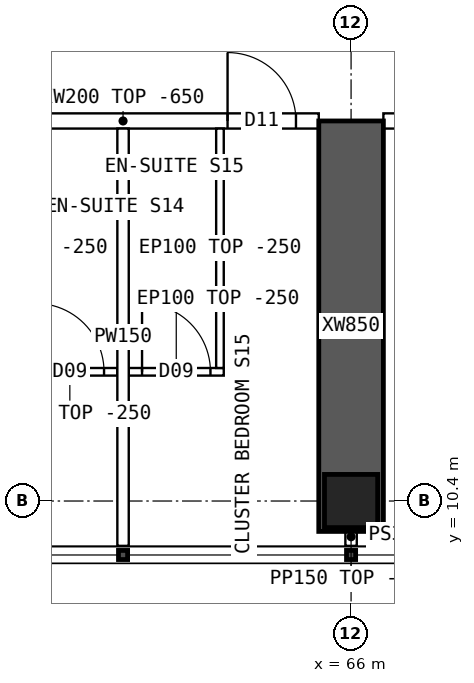
"""IFC4 building model, lengths in metres.
Left out: names, types, materials, properties, quantities, classifications, styles, units other than length and angle.
Written with IfcOpenShell. Run it as: python <this file> out.ifc"""

import sys

from ifc_helpers import new_model, si_unit, direction, frame, frame_2d, origin, origin_2d, place, context, subcontext, project, spatial, polyline, rectangle, hollow_rectangle, outline, extrude, element, fill, save


model = new_model("IFC4")
c1 = context("Model", 3, precision=1e-05, world=origin(), true_north=direction((0.0, 1.0)))
c2 = subcontext(c1, "Body", "Model", "MODEL_VIEW")
j1 = project(units=[si_unit("LENGTHUNIT", "METRE"), si_unit("PLANEANGLEUNIT", "RADIAN")], contexts=[c1])
p1 = place(None, origin())
s1 = spatial("IfcSite", under=j1, at=p1, CompositionType="ELEMENT")
p2 = place(p1, origin())
s2 = spatial("IfcBuilding", under=s1, at=p2, CompositionType="ELEMENT")
p3 = place(p2, frame((0.0, 0.0, 186.1)))
s3 = spatial("IfcBuildingStorey", under=s2, at=p3, CompositionType="ELEMENT", Elevation=186.1)
p4 = place(p3, frame((66.0, 10.4, 0.0), z_axis=(0.0, 0.0, 1.0), x_axis=(1.0, 0.0, 0.0)))
e1 = element("IfcColumn", 1, at=p4, inside=s3, PredefinedType="COLUMN", context=c2, shape_type="SweptSolid", body=[
    extrude(hollow_rectangle(XDim=0.7, YDim=0.7, WallThickness=0.07, at=origin_2d()), origin(), (0.0, 0.0, 1.0), 3.75),
])
p5 = place(p3, frame((66.0, 10.0, 0.0), z_axis=(0.0, 0.0, 1.0), x_axis=(0.0, 1.0, 0.0)))
e2 = element("IfcWall", 2, at=p5, inside=s3, PredefinedType="SHEAR", context=c2, shape_type="SweptSolid", body=[
    extrude(rectangle(XDim=5.4, YDim=0.85, at=frame_2d((2.7, 0.0))), origin(), (0.0, 0.0, 1.0), 3.75),
])
p6 = place(p3, frame((66.8, 9.95, 0.0), z_axis=(0.0, 0.0, 1.0), x_axis=(-1.0, 0.0, 0.0)))
e3 = element("IfcWall", 3, at=p6, inside=s3, PredefinedType="SOLIDWALL", context=c2, shape_type="SweptSolid", body=[
    extrude(rectangle(XDim=0.375, YDim=0.3, at=frame_2d((0.188, 0.0))), origin(), (0.0, 0.0, 1.0), 3.5),
])
p7 = place(p3, frame((60.425, 15.4, 0.0), z_axis=(0.0, 0.0, 1.0), x_axis=(1.0, 0.0, 0.0)))
e4 = element("IfcWall", 4, at=p7, inside=s3, PredefinedType="SOLIDWALL", context=c2, shape_type="SweptSolid", body=[
    extrude(outline(polyline([(0.0, 0.0), (5.15, 0.0), (5.15, 3.1), (0.0, 3.1), (0.0, 0.0)])), frame((0.0, 0.1, 0.0), z_axis=(0.0, -1.0, 0.0), x_axis=(1.0, 0.0, 0.0)), (0.0, 0.0, 1.0), 0.2),
])
p8 = place(p7, frame((0.1, 0.0, 0.0)))
e5 = element("IfcOpeningElement", 5, at=p8, cuts=e4, PredefinedType="OPENING", context=c2, shape_type="SweptSolid", body=[
    extrude(rectangle(XDim=0.9, YDim=2.1, at=frame_2d((0.45, 1.05))), frame((0.0, 0.11, 0.0), z_axis=(0.0, -1.0, 0.0), x_axis=(1.0, 0.0, 0.0)), (0.0, 0.0, 1.0), 0.22),
])
p9 = place(p7, frame((3.95, 0.0, 0.0)))
e6 = element("IfcOpeningElement", 6, at=p9, cuts=e4, PredefinedType="OPENING", context=c2, shape_type="SweptSolid", body=[
    extrude(rectangle(XDim=0.9, YDim=2.1, at=frame_2d((0.45, 1.05))), frame((0.0, 0.11, 0.0), z_axis=(0.0, -1.0, 0.0), x_axis=(1.0, 0.0, 0.0)), (0.0, 0.0, 1.0), 0.22),
])
p10 = place(p3, frame((66.425, 15.4, 0.0), z_axis=(0.0, 0.0, 1.0), x_axis=(1.0, 0.0, 0.0)))
e7 = element("IfcWall", 7, at=p10, inside=s3, PredefinedType="SOLIDWALL", context=c2, shape_type="SweptSolid", body=[
    extrude(rectangle(XDim=1.975, YDim=0.2, at=frame_2d((0.987, 0.0))), origin(), (0.0, 0.0, 1.0), 3.5),
])
p11 = place(p10, frame((0.2, 0.0, 0.0)))
e8 = element("IfcOpeningElement", 8, at=p11, cuts=e7, PredefinedType="OPENING", context=c2, shape_type="SweptSolid", body=[
    extrude(rectangle(XDim=0.9, YDim=2.1, at=frame_2d((0.45, 1.05))), frame((0.0, 0.11, 0.0), z_axis=(0.0, -1.0, 0.0), x_axis=(1.0, 0.0, 0.0)), (0.0, 0.0, 1.0), 0.22),
])
p12 = place(p3, frame((63.0, 9.81, 0.0), z_axis=(0.0, 0.0, 1.0), x_axis=(0.0, 1.0, 0.0)))
e9 = element("IfcWall", 9, at=p12, inside=s3, PredefinedType="PARTITIONING", context=c2, shape_type="SweptSolid", body=[
    extrude(outline(polyline([(0.0, 0.0), (5.49, 0.0), (5.49, 3.1), (5.442, 3.1), (5.44, 3.5), (0.792, 3.5), (0.79, 3.1), (0.392, 3.1), (0.39, 3.5), (0.0, 3.5), (0.0, 0.0)])), frame((0.0, 0.075, 0.0), z_axis=(0.0, -1.0, 0.0), x_axis=(1.0, 0.0, 0.0)), (0.0, 0.0, 1.0), 0.15),
])
p13 = place(p3, frame((62.925, 12.1, 0.0), z_axis=(0.0, 0.0, 1.0), x_axis=(-1.0, 0.0, 0.0)))
e10 = element("IfcWall", 10, at=p13, inside=s3, PredefinedType="PARTITIONING", context=c2, shape_type="SweptSolid", body=[
    extrude(rectangle(XDim=1.25, YDim=0.1, at=frame_2d((0.625, 0.0))), origin(), (0.0, 0.0, 1.0), 3.5),
])
p14 = place(p13, frame((0.175, 0.0, 0.0)))
e11 = element("IfcOpeningElement", 11, at=p14, cuts=e10, PredefinedType="OPENING", context=c2, shape_type="SweptSolid", body=[
    extrude(rectangle(XDim=0.9, YDim=2.1, at=frame_2d((0.45, 1.05))), frame((0.0, 0.06, 0.0), z_axis=(0.0, -1.0, 0.0), x_axis=(1.0, 0.0, 0.0)), (0.0, 0.0, 1.0), 0.12),
])
p15 = place(p3, frame((64.325, 12.1, 0.0), z_axis=(0.0, 0.0, 1.0), x_axis=(-1.0, 0.0, 0.0)))
e12 = element("IfcWall", 12, at=p15, inside=s3, PredefinedType="PARTITIONING", context=c2, shape_type="SweptSolid", body=[
    extrude(rectangle(XDim=1.25, YDim=0.1, at=frame_2d((0.625, 0.0))), origin(), (0.0, 0.0, 1.0), 3.5),
])
p16 = place(p15, frame((0.175, 0.0, 0.0)))
e13 = element("IfcOpeningElement", 13, at=p16, cuts=e12, PredefinedType="OPENING", context=c2, shape_type="SweptSolid", body=[
    extrude(rectangle(XDim=0.9, YDim=2.1, at=frame_2d((0.45, 1.05))), frame((0.0, 0.06, 0.0), z_axis=(0.0, -1.0, 0.0), x_axis=(1.0, 0.0, 0.0)), (0.0, 0.0, 1.0), 0.12),
])
p17 = place(p3, frame((64.275, 12.15, 0.0), z_axis=(0.0, 0.0, 1.0), x_axis=(0.0, 1.0, 0.0)))
e14 = element("IfcWall", 14, at=p17, inside=s3, PredefinedType="PARTITIONING", context=c2, shape_type="SweptSolid", body=[
    extrude(outline(polyline([(0.0, 0.0), (3.15, 0.0), (3.15, 3.1), (3.102, 3.1), (3.1, 3.5), (0.0, 3.5), (0.0, 0.0)])), frame((0.0, 0.05, 0.0), z_axis=(0.0, -1.0, 0.0), x_axis=(1.0, 0.0, 0.0)), (0.0, 0.0, 1.0), 0.1),
])
p18 = place(p3, frame((66.0, 10.05, 0.0), z_axis=(0.0, 0.0, 1.0), x_axis=(0.0, -1.0, 0.0)))
e15 = element("IfcWall", 15, at=p18, inside=s3, PredefinedType="PARTITIONING", context=c2, shape_type="SweptSolid", body=[
    extrude(rectangle(XDim=0.24, YDim=0.15, at=frame_2d((0.12, 0.0))), origin(), (0.0, 0.0, 1.0), 3.5),
])
p19 = place(p14, origin())
e16 = element("IfcDoor", 16, at=p19, inside=s3, OperationType="SINGLE_SWING_RIGHT", PredefinedType="DOOR", context=c2, shape_type="SweptSolid", body=[
    extrude(rectangle(XDim=0.9, YDim=2.1, at=frame_2d((0.45, 1.05))), frame((0.0, 0.025, 0.0), z_axis=(0.0, -1.0, 0.0), x_axis=(1.0, 0.0, 0.0)), (0.0, 0.0, 1.0), 0.05),
])
fill(e11, e16)
p20 = place(p16, origin())
e17 = element("IfcDoor", 17, at=p20, inside=s3, OperationType="SINGLE_SWING_RIGHT", PredefinedType="DOOR", context=c2, shape_type="SweptSolid", body=[
    extrude(rectangle(XDim=0.9, YDim=2.1, at=frame_2d((0.45, 1.05))), frame((0.0, 0.025, 0.0), z_axis=(0.0, -1.0, 0.0), x_axis=(1.0, 0.0, 0.0)), (0.0, 0.0, 1.0), 0.05),
])
fill(e13, e17)
p21 = place(p9, origin())
e18 = element("IfcDoor", 18, at=p21, inside=s3, OperationType="SINGLE_SWING_LEFT", PredefinedType="DOOR", context=c2, shape_type="SweptSolid", body=[
    extrude(rectangle(XDim=0.9, YDim=2.1, at=frame_2d((0.45, 1.05))), frame((0.0, 0.025, 0.0), z_axis=(0.0, -1.0, 0.0), x_axis=(1.0, 0.0, 0.0)), (0.0, 0.0, 1.0), 0.05),
])
fill(e6, e18)
save(model, sys.argv[1])
